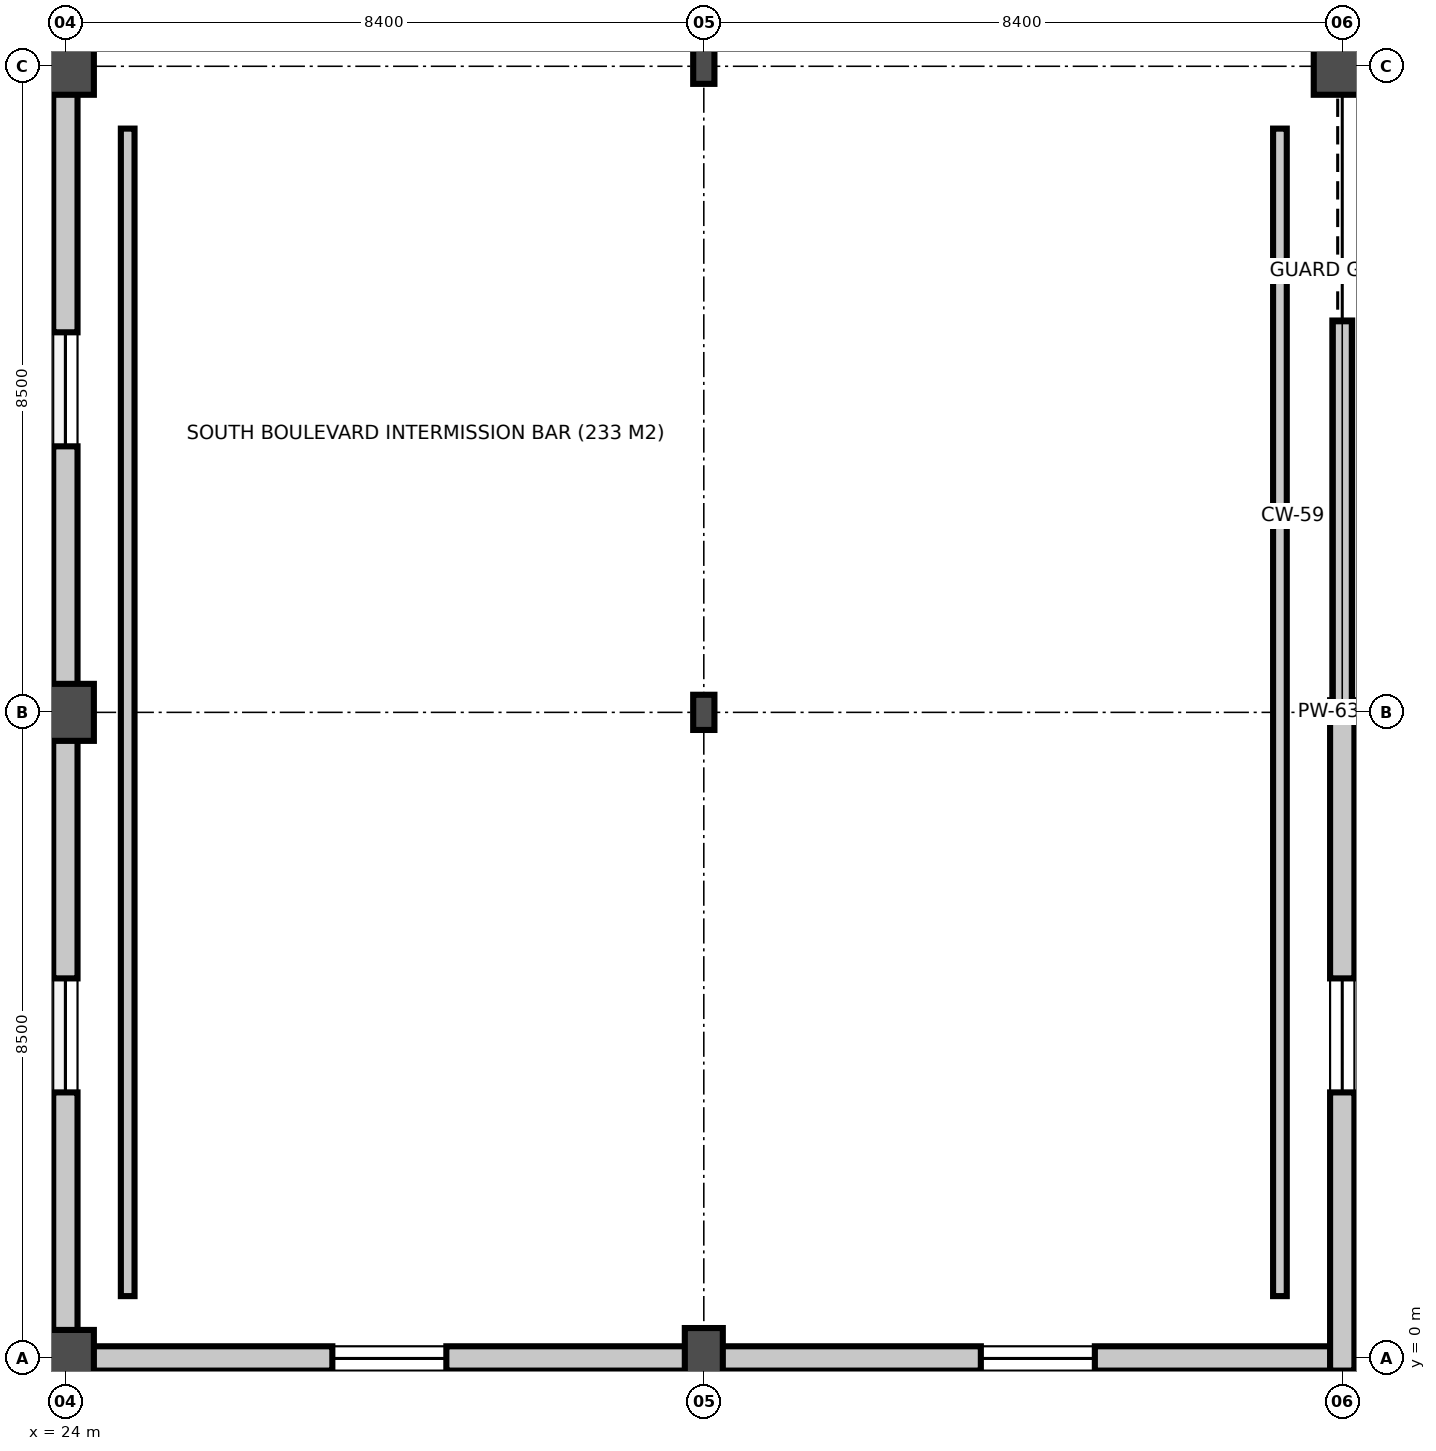
"""IFC4 building model, lengths in metres.
Left out: names, types, materials, properties, quantities, classifications, styles, units other than length and angle.
Written with IfcOpenShell. Run it as: python <this file> out.ifc"""

import sys

from ifc_helpers import new_model, si_unit, direction, frame, frame_2d, origin, origin_2d, place, context, subcontext, project, spatial, rectangle, i_section, extrude, element, fill, save


model = new_model("IFC4")
c1 = context("Model", 3, precision=1e-05, world=origin(), true_north=direction((0.0, 1.0)))
c2 = subcontext(c1, "Body", "Model", "MODEL_VIEW")
j1 = project(units=[si_unit("LENGTHUNIT", "METRE"), si_unit("PLANEANGLEUNIT", "RADIAN")], contexts=[c1])
p1 = place(None, origin())
s1 = spatial("IfcSite", under=j1, at=p1, CompositionType="ELEMENT")
p2 = place(p1, origin())
s2 = spatial("IfcBuilding", under=s1, at=p2, CompositionType="ELEMENT")
p3 = place(p2, frame((0.0, 0.0, 5.4)))
s3 = spatial("IfcBuildingStorey", under=s2, at=p3, CompositionType="ELEMENT", Elevation=5.4)
for number, where, z_axis, x_axis in (
    (1, (24.0, 0.0, 0.0), (0.0, 0.0, 1.0), (1.0, 0.0, 0.0)),
    (2, (24.0, 8.5, 0.0), (0.0, 0.0, 1.0), (1.0, 0.0, 0.0)),
    (3, (24.0, 17.0, 0.0), (0.0, 0.0, 1.0), (1.0, 0.0, 0.0)),
):
    element("IfcColumn", number, at=place(p3, frame(where, z_axis=z_axis, x_axis=x_axis)), inside=s3, PredefinedType="COLUMN", context=c2, shape_type="SweptSolid", body=[
        extrude(rectangle(XDim=0.75, YDim=0.75, at=origin_2d()), origin(), (0.0, 0.0, 1.0), 4.8),
    ])
p4 = place(p3, frame((32.4, 0.0, 0.0), z_axis=(0.0, 0.0, 1.0), x_axis=(1.0, 0.0, 0.0)))
e4 = element("IfcColumn", 4, at=p4, inside=s3, PredefinedType="PILASTER", context=c2, shape_type="SweptSolid", body=[
    extrude(rectangle(XDim=0.5, YDim=0.8, at=origin_2d()), origin(), (0.0, 0.0, 1.0), 4.8),
])
for number, where, z_axis, x_axis in (
    (5, (32.4, 8.5, 0.0), (0.0, 0.0, 1.0), (1.0, 0.0, 0.0)),
    (6, (32.4, 17.0, 0.0), (0.0, 0.0, 1.0), (1.0, 0.0, 0.0)),
):
    element("IfcColumn", number, at=place(p3, frame(where, z_axis=z_axis, x_axis=x_axis)), inside=s3, PredefinedType="PILASTER", context=c2, shape_type="SweptSolid", body=[
        extrude(i_section(OverallWidth=0.28, OverallDepth=0.463, WebThickness=0.011, FlangeThickness=0.017, at=origin_2d()), origin(), (0.0, 0.0, 1.0), 4.8),
    ])
p5 = place(p3, frame((40.8, 17.0, 0.0), z_axis=(0.0, 0.0, 1.0), x_axis=(1.0, 0.0, 0.0)))
e7 = element("IfcColumn", 7, at=p5, inside=s3, PredefinedType="COLUMN", context=c2, shape_type="SweptSolid", body=[
    extrude(rectangle(XDim=0.75, YDim=0.75, at=origin_2d()), origin(), (0.0, 0.0, 1.0), 4.8),
])
p6 = place(p3, frame((32.17, 0.0, 0.0), z_axis=(0.0, 0.0, 1.0), x_axis=(-1.0, 0.0, 0.0)))
e8 = element("IfcWall", 8, at=p6, inside=s3, PredefinedType="SOLIDWALL", context=c2, shape_type="SweptSolid", body=[
    extrude(rectangle(XDim=7.815, YDim=0.32, at=frame_2d((3.907, 0.0))), origin(), (0.0, 0.0, 1.0), 3.599),
])
p7 = place(p6, frame((3.157, 0.0, 0.95)))
e9 = element("IfcOpeningElement", 9, at=p7, cuts=e8, PredefinedType="OPENING", context=c2, shape_type="SweptSolid", body=[
    extrude(rectangle(XDim=1.5, YDim=2.05, at=frame_2d((0.75, 1.025))), frame((0.0, 0.17, 0.0), z_axis=(0.0, -1.0, 0.0), x_axis=(1.0, 0.0, 0.0)), (0.0, 0.0, 1.0), 0.34),
])
p8 = place(p3, frame((40.96, 0.0, 0.0), z_axis=(0.0, 0.0, 1.0), x_axis=(-1.0, 0.0, 0.0)))
e10 = element("IfcWall", 10, at=p8, inside=s3, PredefinedType="SOLIDWALL", context=c2, shape_type="SweptSolid", body=[
    extrude(rectangle(XDim=8.33, YDim=0.32, at=frame_2d((4.165, 0.0))), origin(), (0.0, 0.0, 1.0), 4.53),
])
p9 = place(p8, frame((3.415, 0.0, 0.95)))
e11 = element("IfcOpeningElement", 11, at=p9, cuts=e10, PredefinedType="OPENING", context=c2, shape_type="SweptSolid", body=[
    extrude(rectangle(XDim=1.5, YDim=2.05, at=frame_2d((0.75, 1.025))), frame((0.0, 0.17, 0.0), z_axis=(0.0, -1.0, 0.0), x_axis=(1.0, 0.0, 0.0)), (0.0, 0.0, 1.0), 0.34),
])
p10 = place(p3, frame((24.0, 0.355, 0.0), z_axis=(0.0, 0.0, 1.0), x_axis=(0.0, 1.0, 0.0)))
e12 = element("IfcWall", 12, at=p10, inside=s3, PredefinedType="SOLIDWALL", context=c2, shape_type="SweptSolid", body=[
    extrude(rectangle(XDim=7.79, YDim=0.32, at=frame_2d((3.895, 0.0))), origin(), (0.0, 0.0, 1.0), 3.826),
])
p11 = place(p10, frame((3.145, 0.0, 0.95)))
e13 = element("IfcOpeningElement", 13, at=p11, cuts=e12, PredefinedType="OPENING", context=c2, shape_type="SweptSolid", body=[
    extrude(rectangle(XDim=1.5, YDim=2.05, at=frame_2d((0.75, 1.025))), frame((0.0, 0.17, 0.0), z_axis=(0.0, -1.0, 0.0), x_axis=(1.0, 0.0, 0.0)), (0.0, 0.0, 1.0), 0.34),
])
p12 = place(p3, frame((24.0, 8.855, 0.0), z_axis=(0.0, 0.0, 1.0), x_axis=(0.0, 1.0, 0.0)))
e14 = element("IfcWall", 14, at=p12, inside=s3, PredefinedType="SOLIDWALL", context=c2, shape_type="SweptSolid", body=[
    extrude(rectangle(XDim=7.79, YDim=0.32, at=frame_2d((3.895, 0.0))), origin(), (0.0, 0.0, 1.0), 3.749),
])
p13 = place(p12, frame((3.145, 0.0, 0.95)))
e15 = element("IfcOpeningElement", 15, at=p13, cuts=e14, PredefinedType="OPENING", context=c2, shape_type="SweptSolid", body=[
    extrude(rectangle(XDim=1.5, YDim=2.05, at=frame_2d((0.75, 1.025))), frame((0.0, 0.17, 0.0), z_axis=(0.0, -1.0, 0.0), x_axis=(1.0, 0.0, 0.0)), (0.0, 0.0, 1.0), 0.34),
])
p14 = place(p3, frame((46.8, 15.215, 0.0), z_axis=(0.0, 0.0, 1.0), x_axis=(-0.842498031916, 0.53869942103, 0.0)))
e16 = element("IfcWall", 16, at=p14, inside=s3, PredefinedType="PARAPET", context=c2, shape_type="SweptSolid", body=[
    extrude(rectangle(XDim=7.08, YDim=0.26, at=frame_2d((3.54, 0.0))), origin(), (0.0, 0.0, 1.0), 1.12),
])
p15 = place(p3, frame((40.8, 8.66, 0.0), z_axis=(0.0, 0.0, 1.0), x_axis=(0.0, -1.0, 0.0)))
e17 = element("IfcWall", 17, at=p15, inside=s3, PredefinedType="SOLIDWALL", context=c2, shape_type="SweptSolid", body=[
    extrude(rectangle(XDim=8.82, YDim=0.32, at=frame_2d((4.41, 0.0))), origin(), (0.0, 0.0, 1.0), 4.53),
])
p16 = place(p15, frame((3.66, 0.0, 0.95)))
e18 = element("IfcOpeningElement", 18, at=p16, cuts=e17, PredefinedType="OPENING", context=c2, shape_type="SweptSolid", body=[
    extrude(rectangle(XDim=1.5, YDim=2.05, at=frame_2d((0.75, 1.025))), frame((0.0, 0.17, 0.0), z_axis=(0.0, -1.0, 0.0), x_axis=(1.0, 0.0, 0.0)), (0.0, 0.0, 1.0), 0.34),
])
p17 = place(p3, frame((40.8, 13.655, 0.0), z_axis=(0.0, 0.0, 1.0), x_axis=(0.0, -1.0, 0.0)))
e19 = element("IfcWall", 19, at=p17, inside=s3, PredefinedType="PARAPET", context=c2, shape_type="SweptSolid", body=[
    extrude(rectangle(XDim=5.155, YDim=0.26, at=frame_2d((2.578, 0.0))), origin(), (0.0, 0.0, 1.0), 1.12),
])
for number, where, z_axis, x_axis in (
    (20, (39.98, 16.18, 0.0), (0.0, 0.0, 1.0), (0.0, -1.0, 0.0)),
    (21, (24.82, 0.82, 0.0), (0.0, 0.0, 1.0), (0.0, 1.0, 0.0)),
):
    element("IfcWall", number, at=place(p3, frame(where, z_axis=z_axis, x_axis=x_axis)), inside=s3, PredefinedType="PARTITIONING", context=c2, shape_type="SweptSolid", body=[
        extrude(rectangle(XDim=15.36, YDim=0.18, at=frame_2d((7.68, 0.0))), origin(), (0.0, 0.0, 1.0), 3.45),
    ])
p18 = place(p7, origin())
e22 = element("IfcWindow", 22, at=p18, inside=s3, PartitioningType="SINGLE_PANEL", PredefinedType="WINDOW", context=c2, shape_type="SweptSolid", body=[
    extrude(rectangle(XDim=1.5, YDim=2.05, at=frame_2d((0.75, 1.025))), frame((0.0, 0.03, 0.0), z_axis=(0.0, -1.0, 0.0), x_axis=(1.0, 0.0, 0.0)), (0.0, 0.0, 1.0), 0.06),
])
fill(e9, e22)
p19 = place(p9, origin())
e23 = element("IfcWindow", 23, at=p19, inside=s3, PartitioningType="SINGLE_PANEL", PredefinedType="WINDOW", context=c2, shape_type="SweptSolid", body=[
    extrude(rectangle(XDim=1.5, YDim=2.05, at=frame_2d((0.75, 1.025))), frame((0.0, 0.03, 0.0), z_axis=(0.0, -1.0, 0.0), x_axis=(1.0, 0.0, 0.0)), (0.0, 0.0, 1.0), 0.06),
])
fill(e11, e23)
p20 = place(p11, origin())
e24 = element("IfcWindow", 24, at=p20, inside=s3, PartitioningType="SINGLE_PANEL", PredefinedType="WINDOW", context=c2, shape_type="SweptSolid", body=[
    extrude(rectangle(XDim=1.5, YDim=2.05, at=frame_2d((0.75, 1.025))), frame((0.0, 0.03, 0.0), z_axis=(0.0, -1.0, 0.0), x_axis=(1.0, 0.0, 0.0)), (0.0, 0.0, 1.0), 0.06),
])
fill(e13, e24)
p21 = place(p13, origin())
e25 = element("IfcWindow", 25, at=p21, inside=s3, PartitioningType="SINGLE_PANEL", PredefinedType="WINDOW", context=c2, shape_type="SweptSolid", body=[
    extrude(rectangle(XDim=1.5, YDim=2.05, at=frame_2d((0.75, 1.025))), frame((0.0, 0.03, 0.0), z_axis=(0.0, -1.0, 0.0), x_axis=(1.0, 0.0, 0.0)), (0.0, 0.0, 1.0), 0.06),
])
fill(e15, e25)
p22 = place(p16, origin())
e26 = element("IfcWindow", 26, at=p22, inside=s3, PartitioningType="SINGLE_PANEL", PredefinedType="WINDOW", context=c2, shape_type="SweptSolid", body=[
    extrude(rectangle(XDim=1.5, YDim=2.05, at=frame_2d((0.75, 1.025))), frame((0.0, 0.03, 0.0), z_axis=(0.0, -1.0, 0.0), x_axis=(1.0, 0.0, 0.0)), (0.0, 0.0, 1.0), 0.06),
])
fill(e18, e26)
save(model, sys.argv[1])
